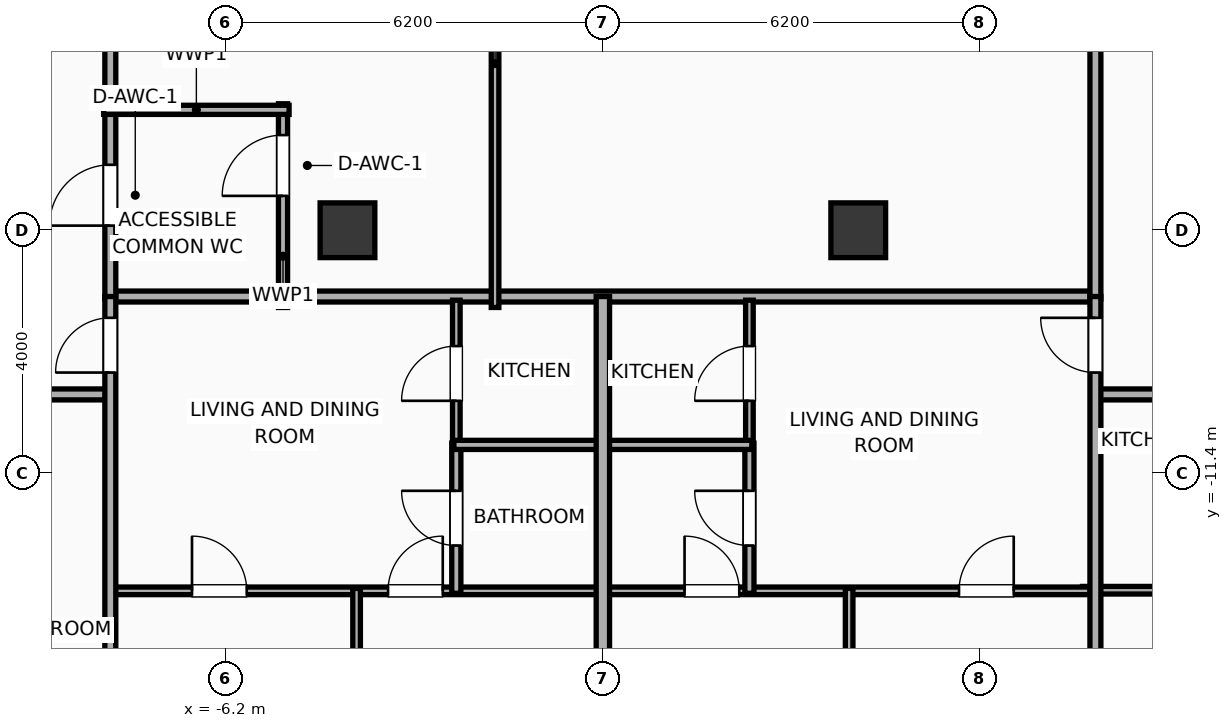
"""IFC4 building model, lengths in metres.
Left out: names, types, materials, properties, quantities, classifications, styles, units other than length and angle.
Written with IfcOpenShell. Run it as: python <this file> out.ifc"""

import sys

from ifc_helpers import new_model, si_unit, direction, frame, frame_2d, origin, origin_2d, place, context, subcontext, project, spatial, rectangle, extrude, element, fill, save


model = new_model("IFC4")
c1 = context("Model", 3, precision=1e-05, world=origin(), true_north=direction((0.0, 1.0)))
c2 = subcontext(c1, "Body", "Model", "MODEL_VIEW")
j1 = project(units=[si_unit("LENGTHUNIT", "METRE"), si_unit("PLANEANGLEUNIT", "RADIAN")], contexts=[c1])
p1 = place(None, origin())
s1 = spatial("IfcSite", under=j1, at=p1, CompositionType="ELEMENT")
p2 = place(p1, origin())
s2 = spatial("IfcBuilding", under=s1, at=p2, CompositionType="ELEMENT")
p3 = place(p2, frame((0.0, 0.0, 299.0)))
s3 = spatial("IfcBuildingStorey", under=s2, at=p3, CompositionType="ELEMENT", Elevation=299.0)
for number, where, z_axis, x_axis in (
    (1, (-4.2, -7.4, 0.0), (0.0, 0.0, 1.0), (1.0, 0.0, 0.0)),
    (2, (4.2, -7.4, 0.0), (0.0, 0.0, 1.0), (1.0, 0.0, 0.0)),
):
    element("IfcColumn", number, at=place(p3, frame(where, z_axis=z_axis, x_axis=x_axis)), inside=s3, PredefinedType="COLUMN", context=c2, shape_type="SweptSolid", body=[
        extrude(rectangle(XDim=0.9, YDim=0.9, at=origin_2d()), origin(), (0.0, 0.0, 1.0), 3.9),
    ])
p4 = place(p3, frame((-8.15, -8.49, 0.0), z_axis=(0.0, 0.0, 1.0), x_axis=(1.0, 0.0, 0.0)))
e3 = element("IfcWall", 3, at=p4, inside=s3, PredefinedType="PARTITIONING", context=c2, shape_type="SweptSolid", body=[
    extrude(rectangle(XDim=16.3, YDim=0.18, at=frame_2d((8.15, 0.0))), origin(), (0.0, 0.0, 1.0), 3.635),
])
p5 = place(p3, frame((-8.1, -8.53, 0.0), z_axis=(0.0, 0.0, 1.0), x_axis=(0.0, 1.0, 0.0)))
e4 = element("IfcWall", 4, at=p5, inside=s3, PredefinedType="PARTITIONING", context=c2, shape_type="SweptSolid", body=[
    extrude(rectangle(XDim=17.06, YDim=0.18, at=frame_2d((8.53, 0.0))), origin(), (0.0, 0.0, 1.0), 3.635),
])
p6 = place(p5, frame((1.206, 0.0, 0.0)))
e5 = element("IfcOpeningElement", 5, at=p6, cuts=e4, PredefinedType="OPENING", context=c2, shape_type="SweptSolid", body=[
    extrude(rectangle(XDim=1.0, YDim=2.05, at=frame_2d((0.5, 1.025))), frame((0.0, 0.1, 0.0), z_axis=(0.0, -1.0, 0.0), x_axis=(1.0, 0.0, 0.0)), (0.0, 0.0, 1.0), 0.2),
])
p7 = place(p5, frame((9.761, 0.0, 0.0)))
e6 = element("IfcOpeningElement", 6, at=p7, cuts=e4, PredefinedType="OPENING", context=c2, shape_type="SweptSolid", body=[
    extrude(rectangle(XDim=0.95, YDim=2.05, at=frame_2d((0.475, 1.025))), frame((0.0, 0.1, 0.0), z_axis=(0.0, -1.0, 0.0), x_axis=(1.0, 0.0, 0.0)), (0.0, 0.0, 1.0), 0.2),
])
p8 = place(p3, frame((8.1, -8.53, 0.0), z_axis=(0.0, 0.0, 1.0), x_axis=(0.0, 1.0, 0.0)))
e7 = element("IfcWall", 7, at=p8, inside=s3, PredefinedType="PARTITIONING", context=c2, shape_type="SweptSolid", body=[
    extrude(rectangle(XDim=17.06, YDim=0.18, at=frame_2d((8.53, 0.0))), origin(), (0.0, 0.0, 1.0), 3.635),
])
p9 = place(p3, frame((-5.26, -8.67, 0.0), z_axis=(0.0, 0.0, 1.0), x_axis=(0.0, 1.0, 0.0)))
e8 = element("IfcWall", 8, at=p9, inside=s3, PredefinedType="PLUMBINGWALL", context=c2, shape_type="SweptSolid", body=[
    extrude(rectangle(XDim=3.35, YDim=0.15, at=frame_2d((1.675, 0.0))), origin(), (0.0, 0.0, 1.0), 3.635),
])
p10 = place(p9, frame((1.835, 0.0, 0.0)))
e9 = element("IfcOpeningElement", 9, at=p10, cuts=e8, PredefinedType="OPENING", context=c2, shape_type="SweptSolid", body=[
    extrude(rectangle(XDim=1.0, YDim=2.05, at=frame_2d((0.5, 1.025))), frame((0.0, 0.085, 0.0), z_axis=(0.0, -1.0, 0.0), x_axis=(1.0, 0.0, 0.0)), (0.0, 0.0, 1.0), 0.17),
])
p11 = place(p3, frame((-8.21, -5.42, 0.0), z_axis=(0.0, 0.0, 1.0), x_axis=(1.0, 0.0, 0.0)))
e10 = element("IfcWall", 10, at=p11, inside=s3, PredefinedType="PLUMBINGWALL", context=c2, shape_type="SweptSolid", body=[
    extrude(rectangle(XDim=3.05, YDim=0.15, at=frame_2d((1.525, 0.0))), origin(), (0.0, 0.0, 1.0), 3.635),
])
p12 = place(p3, frame((-1.773, -8.67, 0.0), z_axis=(0.0, 0.0, 1.0), x_axis=(0.0, 1.0, 0.0)))
e11 = element("IfcWall", 11, at=p12, inside=s3, PredefinedType="PARTITIONING", context=c2, shape_type="SweptSolid", body=[
    extrude(rectangle(XDim=17.29, YDim=0.125, at=frame_2d((8.645, 0.0))), origin(), (0.0, 0.0, 1.0), 3.635),
])
p13 = place(p12, frame((8.17, 0.0, 0.0)))
e12 = element("IfcOpeningElement", 12, at=p13, cuts=e11, PredefinedType="OPENING", context=c2, shape_type="SweptSolid", body=[
    extrude(rectangle(XDim=0.95, YDim=2.05, at=frame_2d((0.475, 1.025))), frame((0.0, 0.073, 0.0), z_axis=(0.0, -1.0, 0.0), x_axis=(1.0, 0.0, 0.0)), (0.0, 0.0, 1.0), 0.145),
])
p14 = place(p3, frame((7.887, -13.32, 0.0), z_axis=(0.0, 0.0, 1.0), x_axis=(1.0, 0.0, 0.0)))
e13 = element("IfcWall", 13, at=p14, inside=s3, PredefinedType="PARTITIONING", context=c2, shape_type="SweptSolid", body=[
    extrude(rectangle(XDim=2.623, YDim=0.125, at=frame_2d((1.311, 0.0))), origin(), (0.0, 0.0, 1.0), 3.635),
])
p15 = place(p3, frame((-30.639, -10.1, 0.0), z_axis=(0.0, 0.0, 1.0), x_axis=(1.0, 0.0, 0.0)))
e14 = element("IfcWall", 14, at=p15, inside=s3, PredefinedType="PARTITIONING", context=c2, shape_type="SweptSolid", body=[
    extrude(rectangle(XDim=22.559, YDim=0.18, at=frame_2d((11.28, 0.0))), origin(), (0.0, 0.0, 1.0), 3.635),
])
p16 = place(p15, frame((2.298, 0.0, 0.0)))
e15 = element("IfcOpeningElement", 15, at=p16, cuts=e14, PredefinedType="OPENING", context=c2, shape_type="SweptSolid", body=[
    extrude(rectangle(XDim=0.9, YDim=2.05, at=frame_2d((0.45, 1.025))), frame((0.0, 0.1, 0.0), z_axis=(0.0, -1.0, 0.0), x_axis=(1.0, 0.0, 0.0)), (0.0, 0.0, 1.0), 0.2),
])
p17 = place(p15, frame((8.812, 0.0, 0.0)))
e16 = element("IfcOpeningElement", 16, at=p17, cuts=e14, PredefinedType="OPENING", context=c2, shape_type="SweptSolid", body=[
    extrude(rectangle(XDim=1.15, YDim=2.05, at=frame_2d((0.575, 1.025))), frame((0.0, 0.1, 0.0), z_axis=(0.0, -1.0, 0.0), x_axis=(1.0, 0.0, 0.0)), (0.0, 0.0, 1.0), 0.2),
])
p18 = place(p15, frame((13.738, 0.0, 0.0)))
e17 = element("IfcOpeningElement", 17, at=p18, cuts=e14, PredefinedType="OPENING", context=c2, shape_type="SweptSolid", body=[
    extrude(rectangle(XDim=0.9, YDim=2.05, at=frame_2d((0.45, 1.025))), frame((0.0, 0.1, 0.0), z_axis=(0.0, -1.0, 0.0), x_axis=(1.0, 0.0, 0.0)), (0.0, 0.0, 1.0), 0.2),
])
p19 = place(p15, frame((20.209, 0.0, 0.0)))
e18 = element("IfcOpeningElement", 18, at=p19, cuts=e14, PredefinedType="OPENING", context=c2, shape_type="SweptSolid", body=[
    extrude(rectangle(XDim=1.15, YDim=2.05, at=frame_2d((0.575, 1.025))), frame((0.0, 0.1, 0.0), z_axis=(0.0, -1.0, 0.0), x_axis=(1.0, 0.0, 0.0)), (0.0, 0.0, 1.0), 0.2),
])
p20 = place(p3, frame((8.08, -10.1, 0.0), z_axis=(0.0, 0.0, 1.0), x_axis=(1.0, 0.0, 0.0)))
e19 = element("IfcWall", 19, at=p20, inside=s3, PredefinedType="PARTITIONING", context=c2, shape_type="SweptSolid", body=[
    extrude(rectangle(XDim=15.236, YDim=0.18, at=frame_2d((7.618, 0.0))), origin(), (0.0, 0.0, 1.0), 3.635),
])
p21 = place(p20, frame((3.4, 0.0, 0.0)))
e20 = element("IfcOpeningElement", 20, at=p21, cuts=e19, PredefinedType="OPENING", context=c2, shape_type="SweptSolid", body=[
    extrude(rectangle(XDim=1.15, YDim=2.05, at=frame_2d((0.575, 1.025))), frame((0.0, 0.1, 0.0), z_axis=(0.0, -1.0, 0.0), x_axis=(1.0, 0.0, 0.0)), (0.0, 0.0, 1.0), 0.2),
])
p22 = place(p20, frame((11.05, 0.0, 0.0)))
e21 = element("IfcOpeningElement", 21, at=p22, cuts=e19, PredefinedType="OPENING", context=c2, shape_type="SweptSolid", body=[
    extrude(rectangle(XDim=1.15, YDim=2.05, at=frame_2d((0.575, 1.025))), frame((0.0, 0.1, 0.0), z_axis=(0.0, -1.0, 0.0), x_axis=(1.0, 0.0, 0.0)), (0.0, 0.0, 1.0), 0.2),
])
p23 = place(p3, frame((-8.08, -13.33, 0.0), z_axis=(0.0, 0.0, 1.0), x_axis=(1.0, 0.0, 0.0)))
e22 = element("IfcWall", 22, at=p23, inside=s3, PredefinedType="PARTITIONING", context=c2, shape_type="SweptSolid", body=[
    extrude(rectangle(XDim=8.06, YDim=0.125, at=frame_2d((4.03, 0.0))), origin(), (0.0, 0.0, 1.0), 3.635),
])
p24 = place(p23, frame((1.323, 0.0, 0.0)))
e23 = element("IfcOpeningElement", 23, at=p24, cuts=e22, PredefinedType="OPENING", context=c2, shape_type="SweptSolid", body=[
    extrude(rectangle(XDim=0.9, YDim=2.05, at=frame_2d((0.45, 1.025))), frame((0.0, 0.073, 0.0), z_axis=(0.0, -1.0, 0.0), x_axis=(1.0, 0.0, 0.0)), (0.0, 0.0, 1.0), 0.145),
])
p25 = place(p23, frame((4.547, 0.0, 0.0)))
e24 = element("IfcOpeningElement", 24, at=p25, cuts=e22, PredefinedType="OPENING", context=c2, shape_type="SweptSolid", body=[
    extrude(rectangle(XDim=0.9, YDim=2.05, at=frame_2d((0.45, 1.025))), frame((0.0, 0.073, 0.0), z_axis=(0.0, -1.0, 0.0), x_axis=(1.0, 0.0, 0.0)), (0.0, 0.0, 1.0), 0.145),
])
p26 = place(p3, frame((-2.41, -10.96, 0.0), z_axis=(0.0, 0.0, 1.0), x_axis=(0.0, 1.0, 0.0)))
e25 = element("IfcWall", 25, at=p26, inside=s3, PredefinedType="PARTITIONING", context=c2, shape_type="SweptSolid", body=[
    extrude(rectangle(XDim=2.41, YDim=0.125, at=frame_2d((1.205, 0.0))), origin(), (0.0, 0.0, 1.0), 3.635),
])
p27 = place(p26, frame((0.755, 0.0, 0.0)))
e26 = element("IfcOpeningElement", 26, at=p27, cuts=e25, PredefinedType="OPENING", context=c2, shape_type="SweptSolid", body=[
    extrude(rectangle(XDim=0.9, YDim=2.05, at=frame_2d((0.45, 1.025))), frame((0.0, 0.073, 0.0), z_axis=(0.0, -1.0, 0.0), x_axis=(1.0, 0.0, 0.0)), (0.0, 0.0, 1.0), 0.145),
])
p28 = place(p3, frame((-2.41, -13.37, 0.0), z_axis=(0.0, 0.0, 1.0), x_axis=(0.0, 1.0, 0.0)))
e27 = element("IfcWall", 27, at=p28, inside=s3, PredefinedType="PLUMBINGWALL", context=c2, shape_type="SweptSolid", body=[
    extrude(rectangle(XDim=2.47, YDim=0.15, at=frame_2d((1.235, 0.0))), origin(), (0.0, 0.0, 1.0), 3.635),
])
p29 = place(p28, frame((0.785, 0.0, 0.0)))
e28 = element("IfcOpeningElement", 28, at=p29, cuts=e27, PredefinedType="OPENING", context=c2, shape_type="SweptSolid", body=[
    extrude(rectangle(XDim=0.9, YDim=2.05, at=frame_2d((0.45, 1.025))), frame((0.0, 0.085, 0.0), z_axis=(0.0, -1.0, 0.0), x_axis=(1.0, 0.0, 0.0)), (0.0, 0.0, 1.0), 0.17),
])
p30 = place(p3, frame((-2.45, -10.93, 0.0), z_axis=(0.0, 0.0, 1.0), x_axis=(1.0, 0.0, 0.0)))
e29 = element("IfcWall", 29, at=p30, inside=s3, PredefinedType="PLUMBINGWALL", context=c2, shape_type="SweptSolid", body=[
    extrude(rectangle(XDim=2.43, YDim=0.15, at=frame_2d((1.215, 0.0))), origin(), (0.0, 0.0, 1.0), 3.635),
])
p31 = place(p3, frame((-4.05, -18.58, 0.0), z_axis=(0.0, 0.0, 1.0), x_axis=(0.0, 1.0, 0.0)))
e30 = element("IfcWall", 30, at=p31, inside=s3, PredefinedType="PARTITIONING", context=c2, shape_type="SweptSolid", body=[
    extrude(rectangle(XDim=5.29, YDim=0.125, at=frame_2d((2.645, 0.0))), origin(), (0.0, 0.0, 1.0), 3.635),
])
p32 = place(p3, frame((-8.1, -18.155, 0.0), z_axis=(0.0, 0.0, 1.0), x_axis=(0.0, 1.0, 0.0)))
e31 = element("IfcWall", 31, at=p32, inside=s3, PredefinedType="PARTITIONING", context=c2, shape_type="SweptSolid", body=[
    extrude(rectangle(XDim=9.665, YDim=0.18, at=frame_2d((4.832, 0.0))), origin(), (0.0, 0.0, 1.0), 3.635),
])
p33 = place(p32, frame((8.414, 0.0, 0.0)))
e32 = element("IfcOpeningElement", 32, at=p33, cuts=e31, PredefinedType="OPENING", context=c2, shape_type="SweptSolid", body=[
    extrude(rectangle(XDim=0.9, YDim=2.05, at=frame_2d((0.45, 1.025))), frame((0.0, 0.1, 0.0), z_axis=(0.0, -1.0, 0.0), x_axis=(1.0, 0.0, 0.0)), (0.0, 0.0, 1.0), 0.2),
])
p34 = place(p3, frame((0.02, -13.33, 0.0), z_axis=(0.0, 0.0, 1.0), x_axis=(1.0, 0.0, 0.0)))
e33 = element("IfcWall", 33, at=p34, inside=s3, PredefinedType="PARTITIONING", context=c2, shape_type="SweptSolid", body=[
    extrude(rectangle(XDim=7.992, YDim=0.125, at=frame_2d((3.996, 0.0))), origin(), (0.0, 0.0, 1.0), 3.635),
])
p35 = place(p34, frame((1.323, 0.0, 0.0)))
e34 = element("IfcOpeningElement", 34, at=p35, cuts=e33, PredefinedType="OPENING", context=c2, shape_type="SweptSolid", body=[
    extrude(rectangle(XDim=0.9, YDim=2.05, at=frame_2d((0.45, 1.025))), frame((0.0, 0.073, 0.0), z_axis=(0.0, -1.0, 0.0), x_axis=(1.0, 0.0, 0.0)), (0.0, 0.0, 1.0), 0.145),
])
p36 = place(p34, frame((5.837, 0.0, 0.0)))
e35 = element("IfcOpeningElement", 35, at=p36, cuts=e33, PredefinedType="OPENING", context=c2, shape_type="SweptSolid", body=[
    extrude(rectangle(XDim=0.9, YDim=2.05, at=frame_2d((0.45, 1.025))), frame((0.0, 0.073, 0.0), z_axis=(0.0, -1.0, 0.0), x_axis=(1.0, 0.0, 0.0)), (0.0, 0.0, 1.0), 0.145),
])
p37 = place(p3, frame((2.41, -10.96, 0.0), z_axis=(0.0, 0.0, 1.0), x_axis=(0.0, 1.0, 0.0)))
e36 = element("IfcWall", 36, at=p37, inside=s3, PredefinedType="PARTITIONING", context=c2, shape_type="SweptSolid", body=[
    extrude(rectangle(XDim=2.41, YDim=0.125, at=frame_2d((1.205, 0.0))), origin(), (0.0, 0.0, 1.0), 3.635),
])
p38 = place(p37, frame((0.755, 0.0, 0.0)))
e37 = element("IfcOpeningElement", 37, at=p38, cuts=e36, PredefinedType="OPENING", context=c2, shape_type="SweptSolid", body=[
    extrude(rectangle(XDim=0.9, YDim=2.05, at=frame_2d((0.45, 1.025))), frame((0.0, 0.073, 0.0), z_axis=(0.0, -1.0, 0.0), x_axis=(1.0, 0.0, 0.0)), (0.0, 0.0, 1.0), 0.145),
])
p39 = place(p3, frame((2.41, -13.37, 0.0), z_axis=(0.0, 0.0, 1.0), x_axis=(0.0, 1.0, 0.0)))
e38 = element("IfcWall", 38, at=p39, inside=s3, PredefinedType="PLUMBINGWALL", context=c2, shape_type="SweptSolid", body=[
    extrude(rectangle(XDim=2.47, YDim=0.15, at=frame_2d((1.235, 0.0))), origin(), (0.0, 0.0, 1.0), 3.075),
])
p40 = place(p39, frame((0.785, 0.0, 0.0)))
e39 = element("IfcOpeningElement", 39, at=p40, cuts=e38, PredefinedType="OPENING", context=c2, shape_type="SweptSolid", body=[
    extrude(rectangle(XDim=0.9, YDim=2.05, at=frame_2d((0.45, 1.025))), frame((0.0, 0.085, 0.0), z_axis=(0.0, -1.0, 0.0), x_axis=(1.0, 0.0, 0.0)), (0.0, 0.0, 1.0), 0.17),
])
p41 = place(p3, frame((0.02, -10.93, 0.0), z_axis=(0.0, 0.0, 1.0), x_axis=(1.0, 0.0, 0.0)))
e40 = element("IfcWall", 40, at=p41, inside=s3, PredefinedType="PLUMBINGWALL", context=c2, shape_type="SweptSolid", body=[
    extrude(rectangle(XDim=2.43, YDim=0.15, at=frame_2d((1.215, 0.0))), origin(), (0.0, 0.0, 1.0), 3.635),
])
p42 = place(p3, frame((4.05, -19.432, 0.0), z_axis=(0.0, 0.0, 1.0), x_axis=(0.0, 1.0, 0.0)))
e41 = element("IfcWall", 41, at=p42, inside=s3, PredefinedType="PARTITIONING", context=c2, shape_type="SweptSolid", body=[
    extrude(rectangle(XDim=6.142, YDim=0.125, at=frame_2d((3.071, 0.0))), origin(), (0.0, 0.0, 1.0), 3.635),
])
p43 = place(p3, frame((8.1, -19.857, 0.0), z_axis=(0.0, 0.0, 1.0), x_axis=(0.0, 1.0, 0.0)))
e42 = element("IfcWall", 42, at=p43, inside=s3, PredefinedType="PARTITIONING", context=c2, shape_type="SweptSolid", body=[
    extrude(rectangle(XDim=11.367, YDim=0.18, at=frame_2d((5.684, 0.0))), origin(), (0.0, 0.0, 1.0), 3.635),
])
p44 = place(p43, frame((10.117, 0.0, 0.0)))
e43 = element("IfcOpeningElement", 43, at=p44, cuts=e42, PredefinedType="OPENING", context=c2, shape_type="SweptSolid", body=[
    extrude(rectangle(XDim=0.9, YDim=2.05, at=frame_2d((0.45, 1.025))), frame((0.0, 0.1, 0.0), z_axis=(0.0, -1.0, 0.0), x_axis=(1.0, 0.0, 0.0)), (0.0, 0.0, 1.0), 0.2),
])
p45 = place(p3, frame((0.0, -19.006, 0.0), z_axis=(0.0, 0.0, 1.0), x_axis=(0.0, 1.0, 0.0)))
e44 = element("IfcWall", 44, at=p45, inside=s3, PredefinedType="PARTITIONING", context=c2, shape_type="SweptSolid", body=[
    extrude(rectangle(XDim=10.516, YDim=0.22, at=frame_2d((5.258, 0.0))), origin(), (0.0, 0.0, 1.0), 3.635),
])
p46 = place(p6, origin())
e45 = element("IfcDoor", 45, at=p46, inside=s3, OperationType="SINGLE_SWING_LEFT", PredefinedType="DOOR", context=c2, shape_type="SweptSolid", body=[
    extrude(rectangle(XDim=1.0, YDim=2.05, at=frame_2d((0.5, 1.025))), frame((0.0, 0.025, 0.0), z_axis=(0.0, -1.0, 0.0), x_axis=(1.0, 0.0, 0.0)), (0.0, 0.0, 1.0), 0.05),
])
fill(e5, e45)
p47 = place(p10, origin())
e46 = element("IfcDoor", 46, at=p47, inside=s3, OperationType="SINGLE_SWING_LEFT", PredefinedType="DOOR", context=c2, shape_type="SweptSolid", body=[
    extrude(rectangle(XDim=1.0, YDim=2.05, at=frame_2d((0.5, 1.025))), frame((0.0, 0.025, 0.0), z_axis=(0.0, -1.0, 0.0), x_axis=(1.0, 0.0, 0.0)), (0.0, 0.0, 1.0), 0.05),
])
fill(e9, e46)
p48 = place(p24, origin())
e47 = element("IfcDoor", 47, at=p48, inside=s3, OperationType="SINGLE_SWING_LEFT", PredefinedType="DOOR", context=c2, shape_type="SweptSolid", body=[
    extrude(rectangle(XDim=0.9, YDim=2.05, at=frame_2d((0.45, 1.025))), frame((0.0, 0.025, 0.0), z_axis=(0.0, -1.0, 0.0), x_axis=(1.0, 0.0, 0.0)), (0.0, 0.0, 1.0), 0.05),
])
fill(e23, e47)
p49 = place(p25, origin())
e48 = element("IfcDoor", 48, at=p49, inside=s3, OperationType="SINGLE_SWING_RIGHT", PredefinedType="DOOR", context=c2, shape_type="SweptSolid", body=[
    extrude(rectangle(XDim=0.9, YDim=2.05, at=frame_2d((0.45, 1.025))), frame((0.0, 0.025, 0.0), z_axis=(0.0, -1.0, 0.0), x_axis=(1.0, 0.0, 0.0)), (0.0, 0.0, 1.0), 0.05),
])
fill(e24, e48)
p50 = place(p27, origin())
e49 = element("IfcDoor", 49, at=p50, inside=s3, OperationType="SINGLE_SWING_LEFT", PredefinedType="DOOR", context=c2, shape_type="SweptSolid", body=[
    extrude(rectangle(XDim=0.9, YDim=2.05, at=frame_2d((0.45, 1.025))), frame((0.0, 0.025, 0.0), z_axis=(0.0, -1.0, 0.0), x_axis=(1.0, 0.0, 0.0)), (0.0, 0.0, 1.0), 0.05),
])
fill(e26, e49)
p51 = place(p29, origin())
e50 = element("IfcDoor", 50, at=p51, inside=s3, OperationType="SINGLE_SWING_RIGHT", PredefinedType="DOOR", context=c2, shape_type="SweptSolid", body=[
    extrude(rectangle(XDim=0.9, YDim=2.05, at=frame_2d((0.45, 1.025))), frame((0.0, 0.025, 0.0), z_axis=(0.0, -1.0, 0.0), x_axis=(1.0, 0.0, 0.0)), (0.0, 0.0, 1.0), 0.05),
])
fill(e28, e50)
p52 = place(p33, origin())
e51 = element("IfcDoor", 51, at=p52, inside=s3, OperationType="SINGLE_SWING_LEFT", PredefinedType="DOOR", context=c2, shape_type="SweptSolid", body=[
    extrude(rectangle(XDim=0.9, YDim=2.05, at=frame_2d((0.45, 1.025))), frame((0.0, 0.025, 0.0), z_axis=(0.0, -1.0, 0.0), x_axis=(1.0, 0.0, 0.0)), (0.0, 0.0, 1.0), 0.05),
])
fill(e32, e51)
p53 = place(p35, origin())
e52 = element("IfcDoor", 52, at=p53, inside=s3, OperationType="SINGLE_SWING_LEFT", PredefinedType="DOOR", context=c2, shape_type="SweptSolid", body=[
    extrude(rectangle(XDim=0.9, YDim=2.05, at=frame_2d((0.45, 1.025))), frame((0.0, 0.025, 0.0), z_axis=(0.0, -1.0, 0.0), x_axis=(1.0, 0.0, 0.0)), (0.0, 0.0, 1.0), 0.05),
])
fill(e34, e52)
p54 = place(p36, origin())
e53 = element("IfcDoor", 53, at=p54, inside=s3, OperationType="SINGLE_SWING_RIGHT", PredefinedType="DOOR", context=c2, shape_type="SweptSolid", body=[
    extrude(rectangle(XDim=0.9, YDim=2.05, at=frame_2d((0.45, 1.025))), frame((0.0, 0.025, 0.0), z_axis=(0.0, -1.0, 0.0), x_axis=(1.0, 0.0, 0.0)), (0.0, 0.0, 1.0), 0.05),
])
fill(e35, e53)
p55 = place(p38, origin())
e54 = element("IfcDoor", 54, at=p55, inside=s3, OperationType="SINGLE_SWING_LEFT", PredefinedType="DOOR", context=c2, shape_type="SweptSolid", body=[
    extrude(rectangle(XDim=0.9, YDim=2.05, at=frame_2d((0.45, 1.025))), frame((0.0, 0.025, 0.0), z_axis=(0.0, -1.0, 0.0), x_axis=(1.0, 0.0, 0.0)), (0.0, 0.0, 1.0), 0.05),
])
fill(e37, e54)
p56 = place(p40, origin())
e55 = element("IfcDoor", 55, at=p56, inside=s3, OperationType="SINGLE_SWING_RIGHT", PredefinedType="DOOR", context=c2, shape_type="SweptSolid", body=[
    extrude(rectangle(XDim=0.9, YDim=2.05, at=frame_2d((0.45, 1.025))), frame((0.0, 0.025, 0.0), z_axis=(0.0, -1.0, 0.0), x_axis=(1.0, 0.0, 0.0)), (0.0, 0.0, 1.0), 0.05),
])
fill(e39, e55)
p57 = place(p44, origin())
e56 = element("IfcDoor", 56, at=p57, inside=s3, OperationType="SINGLE_SWING_RIGHT", PredefinedType="DOOR", context=c2, shape_type="SweptSolid", body=[
    extrude(rectangle(XDim=0.9, YDim=2.05, at=frame_2d((0.45, 1.025))), frame((0.0, 0.025, 0.0), z_axis=(0.0, -1.0, 0.0), x_axis=(1.0, 0.0, 0.0)), (0.0, 0.0, 1.0), 0.05),
])
fill(e43, e56)
save(model, sys.argv[1])
